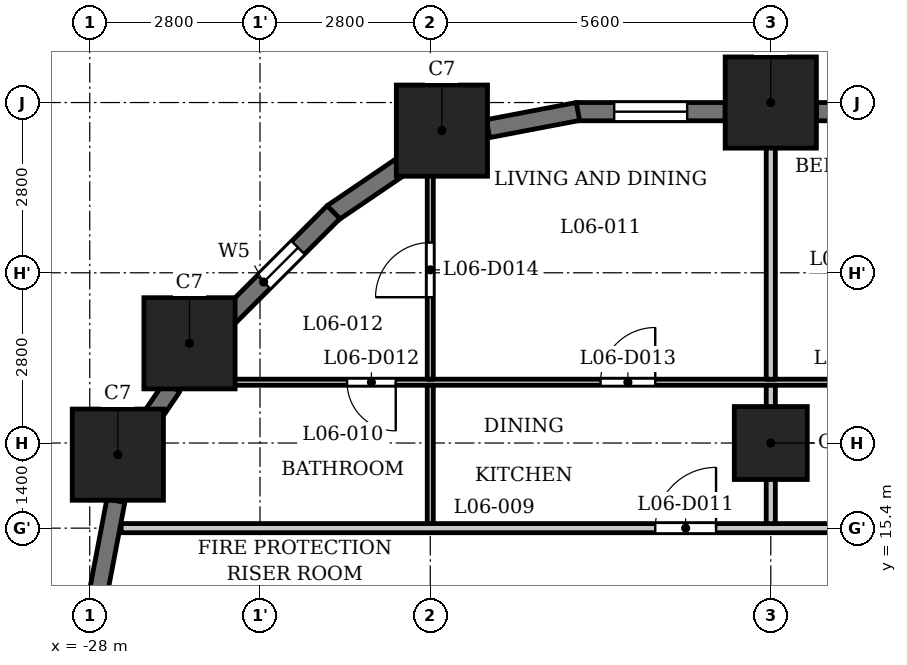
"""IFC4 building model, lengths in metres.
Left out: names, types, materials, properties, quantities, classifications, styles, units other than length and angle.
Written with IfcOpenShell. Run it as: python <this file> out.ifc"""

import sys

from ifc_helpers import new_model, si_unit, direction, frame, frame_2d, origin, origin_2d, place, context, subcontext, project, spatial, rectangle, extrude, element, fill, save


model = new_model("IFC4")
c1 = context("Model", 3, precision=1e-05, world=origin(), true_north=direction((0.0, 1.0)))
c2 = subcontext(c1, "Body", "Model", "MODEL_VIEW")
j1 = project(units=[si_unit("LENGTHUNIT", "METRE"), si_unit("PLANEANGLEUNIT", "RADIAN")], contexts=[c1])
p1 = place(None, origin())
s1 = spatial("IfcSite", under=j1, at=p1, CompositionType="ELEMENT")
p2 = place(p1, origin())
s2 = spatial("IfcBuilding", under=s1, at=p2, CompositionType="ELEMENT")
p3 = place(p2, frame((0.0, 0.0, 30.5)))
s3 = spatial("IfcBuildingStorey", under=s2, at=p3, CompositionType="ELEMENT", Elevation=30.5)
for number, where, z_axis, x_axis in (
    (1, (-16.8, 22.4, 0.0), (0.0, 0.0, 1.0), (1.0, 0.0, 0.0)),
    (2, (-22.209, 21.938, 0.0), (0.0, 0.0, 1.0), (1.0, 0.0, 0.0)),
    (3, (-26.36, 18.44, 0.0), (0.0, 0.0, 1.0), (1.0, 0.0, 0.0)),
    (4, (-27.538, 16.609, 0.0), (0.0, 0.0, 1.0), (1.0, 0.0, 0.0)),
):
    element("IfcColumn", number, at=place(p3, frame(where, z_axis=z_axis, x_axis=x_axis)), inside=s3, PredefinedType="COLUMN", context=c2, shape_type="SweptSolid", body=[
        extrude(rectangle(XDim=1.5, YDim=1.5, at=origin_2d()), origin(), (0.0, 0.0, 1.0), 3.5),
    ])
p4 = place(p3, frame((-16.8, 16.8, 0.0), z_axis=(0.0, 0.0, 1.0), x_axis=(1.0, 0.0, 0.0)))
e5 = element("IfcColumn", 5, at=p4, inside=s3, PredefinedType="COLUMN", context=c2, shape_type="SweptSolid", body=[
    extrude(rectangle(XDim=1.2, YDim=1.2, at=origin_2d()), origin(), (0.0, 0.0, 1.0), 3.5),
])
p5 = place(p3, frame((-11.95, 22.25, 0.0), z_axis=(0.0, 0.0, 1.0), x_axis=(-1.0, 0.0, 0.0)))
e6 = element("IfcWall", 6, at=p5, inside=s3, PredefinedType="SOLIDWALL", context=c2, shape_type="SweptSolid", body=[
    extrude(rectangle(XDim=4.1, YDim=0.3, at=frame_2d((2.05, 0.0))), origin(), (0.0, 0.0, 1.0), 2.35),
])
p6 = place(p5, frame((0.488, 0.0, 0.6)))
e7 = element("IfcOpeningElement", 7, at=p6, cuts=e6, PredefinedType="OPENING", context=c2, shape_type="SweptSolid", body=[
    extrude(rectangle(XDim=1.2, YDim=1.55, at=frame_2d((0.6, 0.775))), frame((0.0, 0.16, 0.0), z_axis=(0.0, -1.0, 0.0), x_axis=(1.0, 0.0, 0.0)), (0.0, 0.0, 1.0), 0.32),
])
p7 = place(p5, frame((2.613, 0.0, 0.6)))
e8 = element("IfcOpeningElement", 8, at=p7, cuts=e6, PredefinedType="OPENING", context=c2, shape_type="SweptSolid", body=[
    extrude(rectangle(XDim=1.2, YDim=1.55, at=frame_2d((0.6, 0.775))), frame((0.0, 0.16, 0.0), z_axis=(0.0, -1.0, 0.0), x_axis=(1.0, 0.0, 0.0)), (0.0, 0.0, 1.0), 0.32),
])
p8 = place(p3, frame((-17.55, 22.25, 0.0), z_axis=(0.0, 0.0, 1.0), x_axis=(-1.0, 0.0, 0.0)))
e9 = element("IfcWall", 9, at=p8, inside=s3, PredefinedType="SOLIDWALL", context=c2, shape_type="SweptSolid", body=[
    extrude(rectangle(XDim=2.45, YDim=0.3, at=frame_2d((1.225, 0.0))), origin(), (0.0, 0.0, 1.0), 2.35),
])
p9 = place(p8, frame((0.625, 0.0, 0.6)))
e10 = element("IfcOpeningElement", 10, at=p9, cuts=e9, PredefinedType="OPENING", context=c2, shape_type="SweptSolid", body=[
    extrude(rectangle(XDim=1.2, YDim=1.55, at=frame_2d((0.6, 0.775))), frame((0.0, 0.16, 0.0), z_axis=(0.0, -1.0, 0.0), x_axis=(1.0, 0.0, 0.0)), (0.0, 0.0, 1.0), 0.32),
])
for number, where, z_axis, x_axis in (
    (11, (-19.972, 22.253, 0.0), (0.0, 0.0, 1.0), (-0.982, -0.187, 0.0)),
    (12, (-22.767, 21.426, 0.0), (0.0, 0.0, 1.0), (-0.827, -0.562, 0.0)),
):
    element("IfcWall", number, at=place(p3, frame(where, z_axis=z_axis, x_axis=x_axis)), inside=s3, PredefinedType="SOLIDWALL", context=c2, shape_type="SweptSolid", body=[
        extrude(rectangle(XDim=1.506, YDim=0.3, at=frame_2d((0.753, 0.0))), origin(), (0.0, 0.0, 1.0), 2.35),
    ])
p10 = place(p3, frame((-23.991, 20.597, 0.0), z_axis=(0.0, 0.0, 1.0), x_axis=(-0.707106781187, -0.707106781187, 0.0)))
e13 = element("IfcWall", 13, at=p10, inside=s3, PredefinedType="SOLIDWALL", context=c2, shape_type="SweptSolid", body=[
    extrude(rectangle(XDim=2.45, YDim=0.3, at=frame_2d((1.225, 0.0))), origin(), (0.0, 0.0, 1.0), 2.35),
])
p11 = place(p10, frame((0.825, 0.0, 0.6)))
e14 = element("IfcOpeningElement", 14, at=p11, cuts=e13, PredefinedType="OPENING", context=c2, shape_type="SweptSolid", body=[
    extrude(rectangle(XDim=0.8, YDim=1.55, at=frame_2d((0.4, 0.775))), frame((0.0, 0.16, 0.0), z_axis=(0.0, -1.0, 0.0), x_axis=(1.0, 0.0, 0.0)), (0.0, 0.0, 1.0), 0.32),
])
p12 = place(p3, frame((-26.645, 17.727, 0.0), z_axis=(0.0, 0.0, 1.0), x_axis=(-0.562083182981, -0.827080706709, 0.0)))
e15 = element("IfcWall", 15, at=p12, inside=s3, PredefinedType="SOLIDWALL", context=c2, shape_type="SweptSolid", body=[
    extrude(rectangle(XDim=0.677, YDim=0.3, at=frame_2d((0.339, 0.0))), origin(), (0.0, 0.0, 1.0), 3.2),
])
p13 = place(p3, frame((-27.571, 15.851, 0.0), z_axis=(0.0, 0.0, 1.0), x_axis=(-0.187223837635, -0.982317277982, 0.0)))
e16 = element("IfcWall", 16, at=p13, inside=s3, PredefinedType="SOLIDWALL", context=c2, shape_type="SweptSolid", body=[
    extrude(rectangle(XDim=1.506, YDim=0.3, at=frame_2d((0.753, 0.0))), origin(), (0.0, 0.0, 1.0), 2.35),
])
p14 = place(p3, frame((-27.484, 15.4, 0.0), z_axis=(0.0, 0.0, 1.0), x_axis=(1.0, 0.0, 0.0)))
e17 = element("IfcWall", 17, at=p14, inside=s3, PredefinedType="PARTITIONING", context=c2, shape_type="SweptSolid", body=[
    extrude(rectangle(XDim=54.968, YDim=0.15, at=frame_2d((27.484, 0.0))), origin(), (0.0, 0.0, 1.0), 3.2),
])
p15 = place(p14, frame((8.784, 0.0, 0.0)))
e18 = element("IfcOpeningElement", 18, at=p15, cuts=e17, PredefinedType="OPENING", context=c2, shape_type="SweptSolid", body=[
    extrude(rectangle(XDim=1.0, YDim=2.1, at=frame_2d((0.5, 1.05))), frame((0.0, 0.085, 0.0), z_axis=(0.0, -1.0, 0.0), x_axis=(1.0, 0.0, 0.0)), (0.0, 0.0, 1.0), 0.17),
])
p16 = place(p14, frame((14.634, 0.0, 0.0)))
e19 = element("IfcOpeningElement", 19, at=p16, cuts=e17, PredefinedType="OPENING", context=c2, shape_type="SweptSolid", body=[
    extrude(rectangle(XDim=1.0, YDim=2.1, at=frame_2d((0.5, 1.05))), frame((0.0, 0.085, 0.0), z_axis=(0.0, -1.0, 0.0), x_axis=(1.0, 0.0, 0.0)), (0.0, 0.0, 1.0), 0.17),
])
p17 = place(p14, frame((23.834, 0.0, 0.0)))
e20 = element("IfcOpeningElement", 20, at=p17, cuts=e17, PredefinedType="OPENING", context=c2, shape_type="SweptSolid", body=[
    extrude(rectangle(XDim=1.0, YDim=2.1, at=frame_2d((0.5, 1.05))), frame((0.0, 0.085, 0.0), z_axis=(0.0, -1.0, 0.0), x_axis=(1.0, 0.0, 0.0)), (0.0, 0.0, 1.0), 0.17),
])
p18 = place(p14, frame((28.184, 0.0, 0.0)))
e21 = element("IfcOpeningElement", 21, at=p18, cuts=e17, PredefinedType="OPENING", context=c2, shape_type="SweptSolid", body=[
    extrude(rectangle(XDim=1.0, YDim=2.1, at=frame_2d((0.5, 1.05))), frame((0.0, 0.085, 0.0), z_axis=(0.0, -1.0, 0.0), x_axis=(1.0, 0.0, 0.0)), (0.0, 0.0, 1.0), 0.17),
])
p19 = place(p14, frame((41.884, 0.0, 0.0)))
e22 = element("IfcOpeningElement", 22, at=p19, cuts=e17, PredefinedType="OPENING", context=c2, shape_type="SweptSolid", body=[
    extrude(rectangle(XDim=1.0, YDim=2.1, at=frame_2d((0.5, 1.05))), frame((0.0, 0.085, 0.0), z_axis=(0.0, -1.0, 0.0), x_axis=(1.0, 0.0, 0.0)), (0.0, 0.0, 1.0), 0.17),
])
p20 = place(p14, frame((48.234, 0.0, 0.0)))
e23 = element("IfcOpeningElement", 23, at=p20, cuts=e17, PredefinedType="OPENING", context=c2, shape_type="SweptSolid", body=[
    extrude(rectangle(XDim=1.0, YDim=2.1, at=frame_2d((0.5, 1.05))), frame((0.0, 0.085, 0.0), z_axis=(0.0, -1.0, 0.0), x_axis=(1.0, 0.0, 0.0)), (0.0, 0.0, 1.0), 0.17),
])
p21 = place(p3, frame((-26.732, 17.8, 0.0), z_axis=(0.0, 0.0, 1.0), x_axis=(1.0, 0.0, 0.0)))
e24 = element("IfcWall", 24, at=p21, inside=s3, PredefinedType="PARTITIONING", context=c2, shape_type="SweptSolid", body=[
    extrude(rectangle(XDim=53.126, YDim=0.1, at=frame_2d((26.563, 0.0))), origin(), (0.0, 0.0, 1.0), 3.2),
])
p22 = place(p21, frame((2.964, 0.0, 0.0)))
e25 = element("IfcOpeningElement", 25, at=p22, cuts=e24, PredefinedType="OPENING", context=c2, shape_type="SweptSolid", body=[
    extrude(rectangle(XDim=0.8, YDim=2.1, at=frame_2d((0.4, 1.05))), frame((0.0, 0.06, 0.0), z_axis=(0.0, -1.0, 0.0), x_axis=(1.0, 0.0, 0.0)), (0.0, 0.0, 1.0), 0.12),
])
p23 = place(p21, frame((7.132, 0.0, 0.0)))
e26 = element("IfcOpeningElement", 26, at=p23, cuts=e24, PredefinedType="OPENING", context=c2, shape_type="SweptSolid", body=[
    extrude(rectangle(XDim=0.9, YDim=2.1, at=frame_2d((0.45, 1.05))), frame((0.0, 0.06, 0.0), z_axis=(0.0, -1.0, 0.0), x_axis=(1.0, 0.0, 0.0)), (0.0, 0.0, 1.0), 0.12),
])
p24 = place(p21, frame((19.432, 0.0, 0.0)))
e27 = element("IfcOpeningElement", 27, at=p24, cuts=e24, PredefinedType="OPENING", context=c2, shape_type="SweptSolid", body=[
    extrude(rectangle(XDim=0.8, YDim=2.1, at=frame_2d((0.4, 1.05))), frame((0.0, 0.06, 0.0), z_axis=(0.0, -1.0, 0.0), x_axis=(1.0, 0.0, 0.0)), (0.0, 0.0, 1.0), 0.12),
])
p25 = place(p21, frame((16.732, 0.0, 0.0)))
e28 = element("IfcOpeningElement", 28, at=p25, cuts=e24, PredefinedType="OPENING", context=c2, shape_type="SweptSolid", body=[
    extrude(rectangle(XDim=0.9, YDim=2.1, at=frame_2d((0.45, 1.05))), frame((0.0, 0.06, 0.0), z_axis=(0.0, -1.0, 0.0), x_axis=(1.0, 0.0, 0.0)), (0.0, 0.0, 1.0), 0.12),
])
p26 = place(p21, frame((10.982, 0.0, 0.0)))
e29 = element("IfcOpeningElement", 29, at=p26, cuts=e24, PredefinedType="OPENING", context=c2, shape_type="SweptSolid", body=[
    extrude(rectangle(XDim=0.9, YDim=2.1, at=frame_2d((0.45, 1.05))), frame((0.0, 0.06, 0.0), z_axis=(0.0, -1.0, 0.0), x_axis=(1.0, 0.0, 0.0)), (0.0, 0.0, 1.0), 0.12),
])
p27 = place(p21, frame((12.982, 0.0, 0.0)))
e30 = element("IfcOpeningElement", 30, at=p27, cuts=e24, PredefinedType="OPENING", context=c2, shape_type="SweptSolid", body=[
    extrude(rectangle(XDim=0.9, YDim=2.1, at=frame_2d((0.45, 1.05))), frame((0.0, 0.06, 0.0), z_axis=(0.0, -1.0, 0.0), x_axis=(1.0, 0.0, 0.0)), (0.0, 0.0, 1.0), 0.12),
])
p28 = place(p21, frame((25.382, 0.0, 0.0)))
e31 = element("IfcOpeningElement", 31, at=p28, cuts=e24, PredefinedType="OPENING", context=c2, shape_type="SweptSolid", body=[
    extrude(rectangle(XDim=0.8, YDim=2.1, at=frame_2d((0.4, 1.05))), frame((0.0, 0.06, 0.0), z_axis=(0.0, -1.0, 0.0), x_axis=(1.0, 0.0, 0.0)), (0.0, 0.0, 1.0), 0.12),
])
p29 = place(p21, frame((22.182, 0.0, 0.0)))
e32 = element("IfcOpeningElement", 32, at=p29, cuts=e24, PredefinedType="OPENING", context=c2, shape_type="SweptSolid", body=[
    extrude(rectangle(XDim=0.9, YDim=2.1, at=frame_2d((0.45, 1.05))), frame((0.0, 0.06, 0.0), z_axis=(0.0, -1.0, 0.0), x_axis=(1.0, 0.0, 0.0)), (0.0, 0.0, 1.0), 0.12),
])
p30 = place(p21, frame((36.232, 0.0, 0.0)))
e33 = element("IfcOpeningElement", 33, at=p30, cuts=e24, PredefinedType="OPENING", context=c2, shape_type="SweptSolid", body=[
    extrude(rectangle(XDim=0.8, YDim=2.1, at=frame_2d((0.4, 1.05))), frame((0.0, 0.06, 0.0), z_axis=(0.0, -1.0, 0.0), x_axis=(1.0, 0.0, 0.0)), (0.0, 0.0, 1.0), 0.12),
])
p31 = place(p21, frame((33.782, 0.0, 0.0)))
e34 = element("IfcOpeningElement", 34, at=p31, cuts=e24, PredefinedType="OPENING", context=c2, shape_type="SweptSolid", body=[
    extrude(rectangle(XDim=0.9, YDim=2.1, at=frame_2d((0.45, 1.05))), frame((0.0, 0.06, 0.0), z_axis=(0.0, -1.0, 0.0), x_axis=(1.0, 0.0, 0.0)), (0.0, 0.0, 1.0), 0.12),
])
p32 = place(p21, frame((27.282, 0.0, 0.0)))
e35 = element("IfcOpeningElement", 35, at=p32, cuts=e24, PredefinedType="OPENING", context=c2, shape_type="SweptSolid", body=[
    extrude(rectangle(XDim=0.9, YDim=2.1, at=frame_2d((0.45, 1.05))), frame((0.0, 0.06, 0.0), z_axis=(0.0, -1.0, 0.0), x_axis=(1.0, 0.0, 0.0)), (0.0, 0.0, 1.0), 0.12),
])
p33 = place(p21, frame((30.282, 0.0, 0.0)))
e36 = element("IfcOpeningElement", 36, at=p33, cuts=e24, PredefinedType="OPENING", context=c2, shape_type="SweptSolid", body=[
    extrude(rectangle(XDim=0.9, YDim=2.1, at=frame_2d((0.45, 1.05))), frame((0.0, 0.06, 0.0), z_axis=(0.0, -1.0, 0.0), x_axis=(1.0, 0.0, 0.0)), (0.0, 0.0, 1.0), 0.12),
])
p34 = place(p21, frame((38.582, 0.0, 0.0)))
e37 = element("IfcOpeningElement", 37, at=p34, cuts=e24, PredefinedType="OPENING", context=c2, shape_type="SweptSolid", body=[
    extrude(rectangle(XDim=0.8, YDim=2.1, at=frame_2d((0.4, 1.05))), frame((0.0, 0.06, 0.0), z_axis=(0.0, -1.0, 0.0), x_axis=(1.0, 0.0, 0.0)), (0.0, 0.0, 1.0), 0.12),
])
p35 = place(p21, frame((41.232, 0.0, 0.0)))
e38 = element("IfcOpeningElement", 38, at=p35, cuts=e24, PredefinedType="OPENING", context=c2, shape_type="SweptSolid", body=[
    extrude(rectangle(XDim=0.9, YDim=2.1, at=frame_2d((0.45, 1.05))), frame((0.0, 0.06, 0.0), z_axis=(0.0, -1.0, 0.0), x_axis=(1.0, 0.0, 0.0)), (0.0, 0.0, 1.0), 0.12),
])
p36 = place(p21, frame((51.532, 0.0, 0.0)))
e39 = element("IfcOpeningElement", 39, at=p36, cuts=e24, PredefinedType="OPENING", context=c2, shape_type="SweptSolid", body=[
    extrude(rectangle(XDim=0.8, YDim=2.1, at=frame_2d((0.4, 1.05))), frame((0.0, 0.06, 0.0), z_axis=(0.0, -1.0, 0.0), x_axis=(1.0, 0.0, 0.0)), (0.0, 0.0, 1.0), 0.12),
])
p37 = place(p21, frame((46.582, 0.0, 0.0)))
e40 = element("IfcOpeningElement", 40, at=p37, cuts=e24, PredefinedType="OPENING", context=c2, shape_type="SweptSolid", body=[
    extrude(rectangle(XDim=0.9, YDim=2.1, at=frame_2d((0.45, 1.05))), frame((0.0, 0.06, 0.0), z_axis=(0.0, -1.0, 0.0), x_axis=(1.0, 0.0, 0.0)), (0.0, 0.0, 1.0), 0.12),
])
p38 = place(p3, frame((-22.4, 15.475, 0.0), z_axis=(0.0, 0.0, 1.0), x_axis=(0.0, 1.0, 0.0)))
e41 = element("IfcWall", 41, at=p38, inside=s3, PredefinedType="PARTITIONING", context=c2, shape_type="SweptSolid", body=[
    extrude(rectangle(XDim=2.275, YDim=0.1, at=frame_2d((1.137, 0.0))), origin(), (0.0, 0.0, 1.0), 3.2),
])
p39 = place(p3, frame((-22.4, 17.85, 0.0), z_axis=(0.0, 0.0, 1.0), x_axis=(0.0, 1.0, 0.0)))
e42 = element("IfcWall", 42, at=p39, inside=s3, PredefinedType="PARTITIONING", context=c2, shape_type="SweptSolid", body=[
    extrude(rectangle(XDim=3.87, YDim=0.1, at=frame_2d((1.935, 0.0))), origin(), (0.0, 0.0, 1.0), 3.2),
])
p40 = place(p39, frame((1.348, 0.0, 0.0)))
e43 = element("IfcOpeningElement", 43, at=p40, cuts=e42, PredefinedType="OPENING", context=c2, shape_type="SweptSolid", body=[
    extrude(rectangle(XDim=0.9, YDim=2.1, at=frame_2d((0.45, 1.05))), frame((0.0, 0.06, 0.0), z_axis=(0.0, -1.0, 0.0), x_axis=(1.0, 0.0, 0.0)), (0.0, 0.0, 1.0), 0.12),
])
p41 = place(p3, frame((-16.8, 15.475, 0.0), z_axis=(0.0, 0.0, 1.0), x_axis=(0.0, 1.0, 0.0)))
e44 = element("IfcWall", 44, at=p41, inside=s3, PredefinedType="PARTITIONING", context=c2, shape_type="SweptSolid", body=[
    extrude(rectangle(XDim=2.275, YDim=0.15, at=frame_2d((1.137, 0.0))), origin(), (0.0, 0.0, 1.0), 3.2),
])
p42 = place(p3, frame((-16.8, 17.85, 0.0), z_axis=(0.0, 0.0, 1.0), x_axis=(0.0, 1.0, 0.0)))
e45 = element("IfcWall", 45, at=p42, inside=s3, PredefinedType="PARTITIONING", context=c2, shape_type="SweptSolid", body=[
    extrude(rectangle(XDim=5.28, YDim=0.15, at=frame_2d((2.64, 0.0))), origin(), (0.0, 0.0, 1.0), 3.2),
])
p43 = place(p15, origin())
e46 = element("IfcDoor", 46, at=p43, inside=s3, OperationType="SINGLE_SWING_LEFT", PredefinedType="DOOR", context=c2, shape_type="SweptSolid", body=[
    extrude(rectangle(XDim=1.0, YDim=2.1, at=frame_2d((0.5, 1.05))), frame((0.0, 0.025, 0.0), z_axis=(0.0, -1.0, 0.0), x_axis=(1.0, 0.0, 0.0)), (0.0, 0.0, 1.0), 0.05),
])
fill(e18, e46)
p44 = place(p22, origin())
e47 = element("IfcDoor", 47, at=p44, inside=s3, OperationType="SINGLE_SWING_RIGHT", PredefinedType="DOOR", context=c2, shape_type="SweptSolid", body=[
    extrude(rectangle(XDim=0.8, YDim=2.1, at=frame_2d((0.4, 1.05))), frame((0.0, 0.025, 0.0), z_axis=(0.0, -1.0, 0.0), x_axis=(1.0, 0.0, 0.0)), (0.0, 0.0, 1.0), 0.05),
])
fill(e25, e47)
p45 = place(p23, origin())
e48 = element("IfcDoor", 48, at=p45, inside=s3, OperationType="SINGLE_SWING_LEFT", PredefinedType="DOOR", context=c2, shape_type="SweptSolid", body=[
    extrude(rectangle(XDim=0.9, YDim=2.1, at=frame_2d((0.45, 1.05))), frame((0.0, 0.025, 0.0), z_axis=(0.0, -1.0, 0.0), x_axis=(1.0, 0.0, 0.0)), (0.0, 0.0, 1.0), 0.05),
])
fill(e26, e48)
p46 = place(p40, origin())
e49 = element("IfcDoor", 49, at=p46, inside=s3, OperationType="SINGLE_SWING_RIGHT", PredefinedType="DOOR", context=c2, shape_type="SweptSolid", body=[
    extrude(rectangle(XDim=0.9, YDim=2.1, at=frame_2d((0.45, 1.05))), frame((0.0, 0.025, 0.0), z_axis=(0.0, -1.0, 0.0), x_axis=(1.0, 0.0, 0.0)), (0.0, 0.0, 1.0), 0.05),
])
fill(e43, e49)
p47 = place(p9, origin())
e50 = element("IfcWindow", 50, at=p47, inside=s3, PartitioningType="SINGLE_PANEL", PredefinedType="WINDOW", context=c2, shape_type="SweptSolid", body=[
    extrude(rectangle(XDim=1.2, YDim=1.55, at=frame_2d((0.6, 0.775))), frame((0.0, 0.03, 0.0), z_axis=(0.0, -1.0, 0.0), x_axis=(1.0, 0.0, 0.0)), (0.0, 0.0, 1.0), 0.06),
])
fill(e10, e50)
p48 = place(p11, origin())
e51 = element("IfcWindow", 51, at=p48, inside=s3, PartitioningType="SINGLE_PANEL", PredefinedType="WINDOW", context=c2, shape_type="SweptSolid", body=[
    extrude(rectangle(XDim=0.8, YDim=1.55, at=frame_2d((0.4, 0.775))), frame((0.0, 0.03, 0.0), z_axis=(0.0, -1.0, 0.0), x_axis=(1.0, 0.0, 0.0)), (0.0, 0.0, 1.0), 0.06),
])
fill(e14, e51)
save(model, sys.argv[1])
